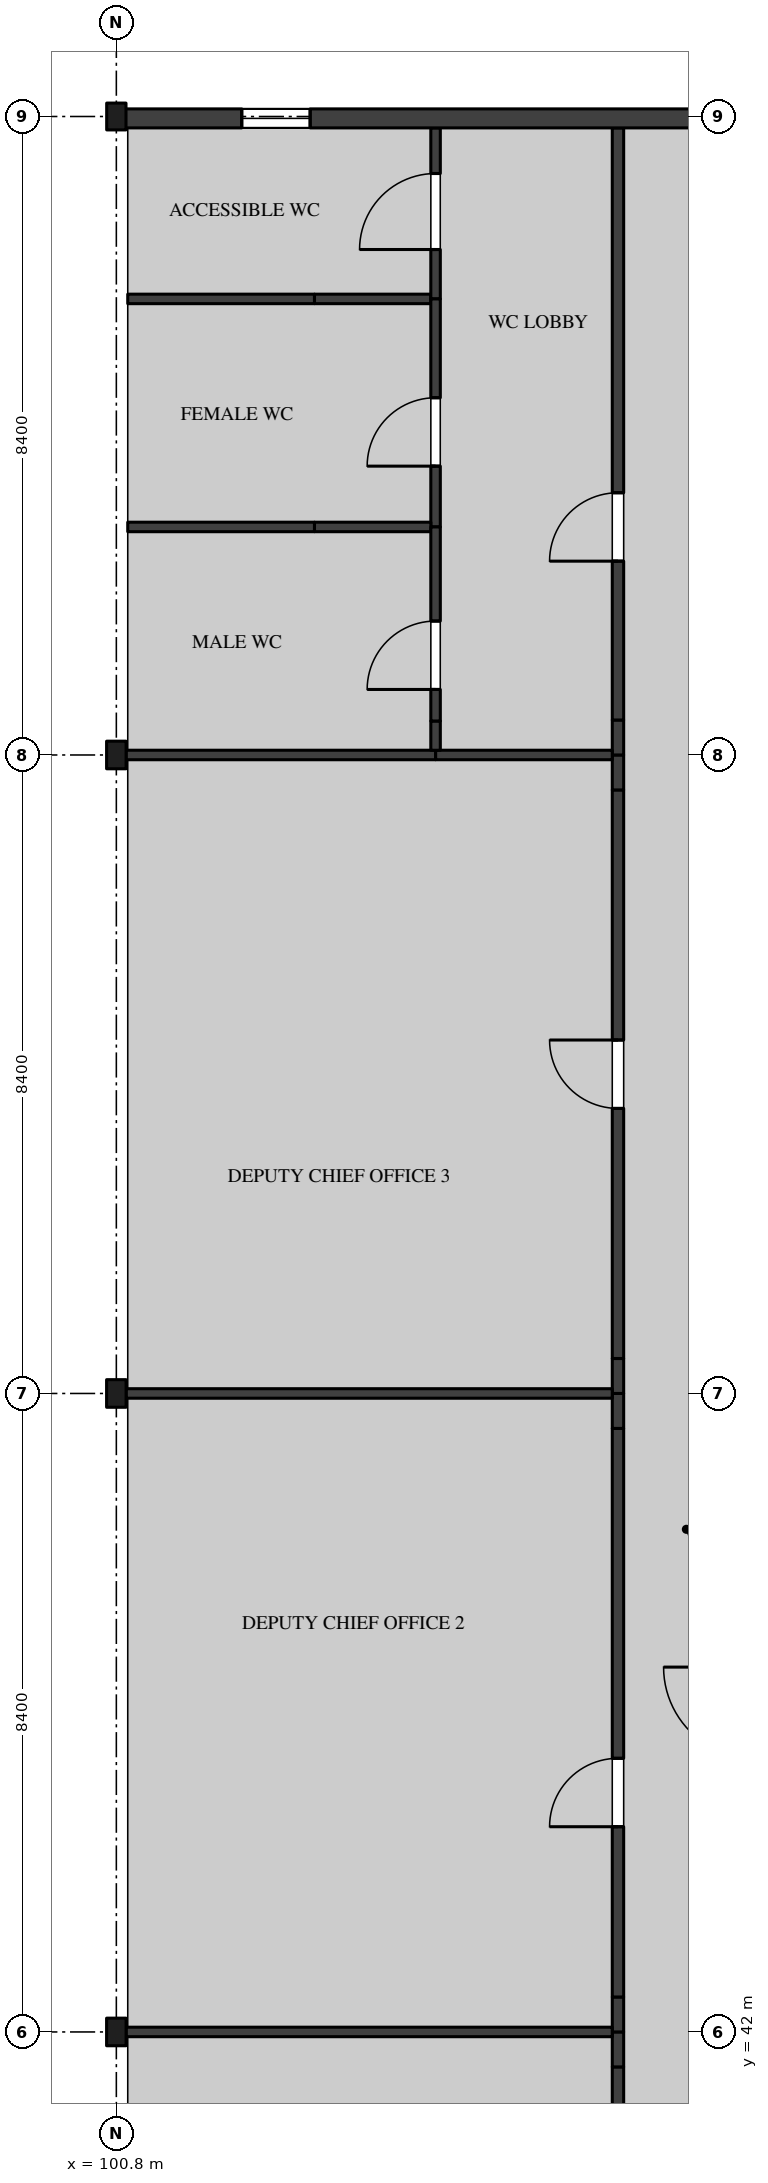
"""IFC4 building model, lengths in metres.
Left out: names, types, materials, properties, quantities, classifications, styles, units other than length and angle.
Written with IfcOpenShell. Run it as: python <this file> out.ifc"""

import sys

from ifc_helpers import new_model, si_unit, direction, frame, frame_2d, origin, origin_2d, place, context, subcontext, project, spatial, rectangle, i_section, extrude, element, fill, save


model = new_model("IFC4")
c1 = context("Model", 3, precision=1e-05, world=origin(), true_north=direction((0.0, 1.0)))
c2 = subcontext(c1, "Body", "Model", "MODEL_VIEW")
j1 = project(units=[si_unit("LENGTHUNIT", "METRE"), si_unit("PLANEANGLEUNIT", "RADIAN")], contexts=[c1])
p1 = place(None, origin())
s1 = spatial("IfcSite", under=j1, at=p1, CompositionType="ELEMENT")
p2 = place(p1, origin())
s2 = spatial("IfcBuilding", under=s1, at=p2, CompositionType="ELEMENT")
p3 = place(p2, frame((0.0, 0.0, 36.9)))
s3 = spatial("IfcBuildingStorey", under=s2, at=p3, CompositionType="ELEMENT", Elevation=36.9)
for number, where, z_axis, x_axis in (
    (1, (100.8, 42.0, 0.0), (0.0, 0.0, 1.0), (1.0, 0.0, 0.0)),
    (2, (100.8, 50.4, 0.0), (0.0, 0.0, 1.0), (1.0, 0.0, 0.0)),
    (3, (100.8, 58.8, 0.0), (0.0, 0.0, 1.0), (1.0, 0.0, 0.0)),
):
    element("IfcColumn", number, at=place(p3, frame(where, z_axis=z_axis, x_axis=x_axis)), inside=s3, PredefinedType="COLUMN", context=c2, shape_type="SweptSolid", body=[
        extrude(i_section(OverallWidth=0.257, OverallDepth=0.363, WebThickness=0.013, FlangeThickness=0.022, FilletRadius=0.015, at=origin_2d()), origin(), (0.0, 0.0, 1.0), 4.37),
    ])
p4 = place(p3, frame((100.8, 67.2, 0.0), z_axis=(0.0, 0.0, 1.0), x_axis=(1.0, 0.0, 0.0)))
e4 = element("IfcColumn", 4, at=p4, inside=s3, PredefinedType="COLUMN", context=c2, shape_type="SweptSolid", body=[
    extrude(i_section(OverallWidth=0.254, OverallDepth=0.353, WebThickness=0.01, FlangeThickness=0.016, FilletRadius=0.015, at=origin_2d()), origin(), (0.0, 0.0, 1.0), 4.37),
])
p5 = place(p3, frame((107.4, 33.75, 0.0), z_axis=(0.0, 0.0, 1.0), x_axis=(0.0, 1.0, 0.0)))
e5 = element("IfcWall", 5, at=p5, inside=s3, PredefinedType="PARTITIONING", context=c2, shape_type="SweptSolid", body=[
    extrude(rectangle(XDim=7.79, YDim=0.15, at=frame_2d((3.895, 0.0))), origin(), (0.0, 0.0, 1.0), 4.37),
])
p6 = place(p5, frame((3.6, 0.0, 0.0)))
e6 = element("IfcOpeningElement", 6, at=p6, cuts=e5, PredefinedType="OPENING", context=c2, shape_type="SweptSolid", body=[
    extrude(rectangle(XDim=0.9, YDim=2.1, at=frame_2d((0.45, 1.05))), frame((0.0, 0.085, 0.0), z_axis=(0.0, -1.0, 0.0), x_axis=(1.0, 0.0, 0.0)), (0.0, 0.0, 1.0), 0.17),
])
for number, where, z_axis, x_axis in (
    (7, (107.4, 41.54, 0.0), (0.0, 0.0, 1.0), (0.0, 1.0, 0.0)),
    (8, (107.4, 42.0, 0.0), (0.0, 0.0, 1.0), (0.0, 1.0, 0.0)),
):
    element("IfcWall", number, at=place(p3, frame(where, z_axis=z_axis, x_axis=x_axis)), inside=s3, PredefinedType="PARTITIONING", context=c2, shape_type="SweptSolid", body=[
        extrude(rectangle(XDim=0.46, YDim=0.15, at=frame_2d((0.23, 0.0))), origin(), (0.0, 0.0, 1.0), 3.817),
    ])
p7 = place(p3, frame((107.4, 42.46, 0.0), z_axis=(0.0, 0.0, 1.0), x_axis=(0.0, 1.0, 0.0)))
e9 = element("IfcWall", 9, at=p7, inside=s3, PredefinedType="PARTITIONING", context=c2, shape_type="SweptSolid", body=[
    extrude(rectangle(XDim=7.48, YDim=0.15, at=frame_2d((3.74, 0.0))), origin(), (0.0, 0.0, 1.0), 4.37),
])
p8 = place(p7, frame((2.24, 0.0, 0.0)))
e10 = element("IfcOpeningElement", 10, at=p8, cuts=e9, PredefinedType="OPENING", context=c2, shape_type="SweptSolid", body=[
    extrude(rectangle(XDim=0.9, YDim=2.1, at=frame_2d((0.45, 1.05))), frame((0.0, 0.085, 0.0), z_axis=(0.0, -1.0, 0.0), x_axis=(1.0, 0.0, 0.0)), (0.0, 0.0, 1.0), 0.17),
])
p9 = place(p3, frame((107.4, 49.94, 0.0), z_axis=(0.0, 0.0, 1.0), x_axis=(0.0, 1.0, 0.0)))
e11 = element("IfcWall", 11, at=p9, inside=s3, PredefinedType="PARTITIONING", context=c2, shape_type="SweptSolid", body=[
    extrude(rectangle(XDim=0.46, YDim=0.15, at=frame_2d((0.23, 0.0))), origin(), (0.0, 0.0, 1.0), 3.817),
])
p10 = place(p3, frame((107.4, 50.4, 0.0), z_axis=(0.0, 0.0, 1.0), x_axis=(0.0, 1.0, 0.0)))
e12 = element("IfcWall", 12, at=p10, inside=s3, PredefinedType="PARTITIONING", context=c2, shape_type="SweptSolid", body=[
    extrude(rectangle(XDim=0.46, YDim=0.15, at=frame_2d((0.23, 0.0))), origin(), (0.0, 0.0, 1.0), 3.817),
])
p11 = place(p3, frame((107.4, 50.86, 0.0), z_axis=(0.0, 0.0, 1.0), x_axis=(0.0, 1.0, 0.0)))
e13 = element("IfcWall", 13, at=p11, inside=s3, PredefinedType="PARTITIONING", context=c2, shape_type="SweptSolid", body=[
    extrude(rectangle(XDim=7.48, YDim=0.15, at=frame_2d((3.74, 0.0))), origin(), (0.0, 0.0, 1.0), 4.37),
])
p12 = place(p11, frame((3.29, 0.0, 0.0)))
e14 = element("IfcOpeningElement", 14, at=p12, cuts=e13, PredefinedType="OPENING", context=c2, shape_type="SweptSolid", body=[
    extrude(rectangle(XDim=0.9, YDim=2.1, at=frame_2d((0.45, 1.05))), frame((0.0, 0.085, 0.0), z_axis=(0.0, -1.0, 0.0), x_axis=(1.0, 0.0, 0.0)), (0.0, 0.0, 1.0), 0.17),
])
for number, where, z_axis, x_axis in (
    (15, (107.4, 58.34, 0.0), (0.0, 0.0, 1.0), (0.0, 1.0, 0.0)),
    (16, (107.4, 58.8, 0.0), (0.0, 0.0, 1.0), (0.0, 1.0, 0.0)),
):
    element("IfcWall", number, at=place(p3, frame(where, z_axis=z_axis, x_axis=x_axis)), inside=s3, PredefinedType="PARTITIONING", context=c2, shape_type="SweptSolid", body=[
        extrude(rectangle(XDim=0.46, YDim=0.15, at=frame_2d((0.23, 0.0))), origin(), (0.0, 0.0, 1.0), 3.817),
    ])
p13 = place(p3, frame((107.4, 59.26, 0.0), z_axis=(0.0, 0.0, 1.0), x_axis=(0.0, 1.0, 0.0)))
e17 = element("IfcWall", 17, at=p13, inside=s3, PredefinedType="PARTITIONING", context=c2, shape_type="SweptSolid", body=[
    extrude(rectangle(XDim=7.79, YDim=0.15, at=frame_2d((3.895, 0.0))), origin(), (0.0, 0.0, 1.0), 4.37),
])
p14 = place(p13, frame((2.09, 0.0, 0.0)))
e18 = element("IfcOpeningElement", 18, at=p14, cuts=e17, PredefinedType="OPENING", context=c2, shape_type="SweptSolid", body=[
    extrude(rectangle(XDim=0.9, YDim=2.1, at=frame_2d((0.45, 1.05))), frame((0.0, 0.085, 0.0), z_axis=(0.0, -1.0, 0.0), x_axis=(1.0, 0.0, 0.0)), (0.0, 0.0, 1.0), 0.17),
])
for number, where, z_axis, x_axis in (
    (19, (100.928, 42.0, 0.0), (0.0, 0.0, 1.0), (1.0, 0.0, 0.0)),
    (20, (100.928, 50.4, 0.0), (0.0, 0.0, 1.0), (1.0, 0.0, 0.0)),
):
    element("IfcWall", number, at=place(p3, frame(where, z_axis=z_axis, x_axis=x_axis)), inside=s3, PredefinedType="PARTITIONING", context=c2, shape_type="SweptSolid", body=[
        extrude(rectangle(XDim=6.397, YDim=0.125, at=frame_2d((3.198, 0.0))), origin(), (0.0, 0.0, 1.0), 3.817),
    ])
p15 = place(p3, frame((105.0, 58.8, 0.0), z_axis=(0.0, 0.0, 1.0), x_axis=(1.0, 0.0, 0.0)))
e21 = element("IfcWall", 21, at=p15, inside=s3, PredefinedType="PARTITIONING", context=c2, shape_type="SweptSolid", body=[
    extrude(rectangle(XDim=2.325, YDim=0.125, at=frame_2d((1.163, 0.0))), origin(), (0.0, 0.0, 1.0), 3.817),
])
p16 = place(p3, frame((100.928, 58.8, 0.0), z_axis=(0.0, 0.0, 1.0), x_axis=(1.0, 0.0, 0.0)))
e22 = element("IfcWall", 22, at=p16, inside=s3, PredefinedType="PARTITIONING", context=c2, shape_type="SweptSolid", body=[
    extrude(rectangle(XDim=4.072, YDim=0.125, at=frame_2d((2.036, 0.0))), origin(), (0.0, 0.0, 1.0), 3.817),
])
p17 = place(p3, frame((100.95, 64.8, 0.0), z_axis=(0.0, 0.0, 1.0), x_axis=(1.0, 0.0, 0.0)))
e23 = element("IfcWall", 23, at=p17, inside=s3, PredefinedType="PARTITIONING", context=c2, shape_type="SweptSolid", body=[
    extrude(rectangle(XDim=2.457, YDim=0.125, at=frame_2d((1.229, 0.0))), origin(), (0.0, 0.0, 1.0), 4.37),
])
p18 = place(p3, frame((103.407, 64.8, 0.0), z_axis=(0.0, 0.0, 1.0), x_axis=(1.0, 0.0, 0.0)))
e24 = element("IfcWall", 24, at=p18, inside=s3, PredefinedType="PARTITIONING", context=c2, shape_type="SweptSolid", body=[
    extrude(rectangle(XDim=1.531, YDim=0.125, at=frame_2d((0.766, 0.0))), origin(), (0.0, 0.0, 1.0), 3.946),
])
p19 = place(p3, frame((105.0, 64.8, 0.0), z_axis=(0.0, 0.0, 1.0), x_axis=(0.0, 1.0, 0.0)))
e25 = element("IfcWall", 25, at=p19, inside=s3, PredefinedType="PARTITIONING", context=c2, shape_type="SweptSolid", body=[
    extrude(rectangle(XDim=2.25, YDim=0.125, at=frame_2d((1.125, 0.0))), origin(), (0.0, 0.0, 1.0), 4.37),
])
p20 = place(p19, frame((0.65, 0.0, 0.0)))
e26 = element("IfcOpeningElement", 26, at=p20, cuts=e25, PredefinedType="OPENING", context=c2, shape_type="SweptSolid", body=[
    extrude(rectangle(XDim=1.0, YDim=2.1, at=frame_2d((0.5, 1.05))), frame((0.0, 0.073, 0.0), z_axis=(0.0, -1.0, 0.0), x_axis=(1.0, 0.0, 0.0)), (0.0, 0.0, 1.0), 0.145),
])
p21 = place(p3, frame((105.0, 61.8, 0.0), z_axis=(0.0, 0.0, 1.0), x_axis=(0.0, 1.0, 0.0)))
e27 = element("IfcWall", 27, at=p21, inside=s3, PredefinedType="PARTITIONING", context=c2, shape_type="SweptSolid", body=[
    extrude(rectangle(XDim=3.0, YDim=0.125, at=frame_2d((1.5, 0.0))), origin(), (0.0, 0.0, 1.0), 4.37),
])
p22 = place(p21, frame((0.8, 0.0, 0.0)))
e28 = element("IfcOpeningElement", 28, at=p22, cuts=e27, PredefinedType="OPENING", context=c2, shape_type="SweptSolid", body=[
    extrude(rectangle(XDim=0.9, YDim=2.1, at=frame_2d((0.45, 1.05))), frame((0.0, 0.073, 0.0), z_axis=(0.0, -1.0, 0.0), x_axis=(1.0, 0.0, 0.0)), (0.0, 0.0, 1.0), 0.145),
])
p23 = place(p3, frame((100.95, 61.8, 0.0), z_axis=(0.0, 0.0, 1.0), x_axis=(1.0, 0.0, 0.0)))
e29 = element("IfcWall", 29, at=p23, inside=s3, PredefinedType="PARTITIONING", context=c2, shape_type="SweptSolid", body=[
    extrude(rectangle(XDim=2.457, YDim=0.125, at=frame_2d((1.229, 0.0))), origin(), (0.0, 0.0, 1.0), 4.37),
])
p24 = place(p3, frame((103.407, 61.8, 0.0), z_axis=(0.0, 0.0, 1.0), x_axis=(1.0, 0.0, 0.0)))
e30 = element("IfcWall", 30, at=p24, inside=s3, PredefinedType="PARTITIONING", context=c2, shape_type="SweptSolid", body=[
    extrude(rectangle(XDim=1.531, YDim=0.125, at=frame_2d((0.766, 0.0))), origin(), (0.0, 0.0, 1.0), 3.946),
])
p25 = place(p3, frame((105.0, 58.862, 0.0), z_axis=(0.0, 0.0, 1.0), x_axis=(0.0, 1.0, 0.0)))
e31 = element("IfcWall", 31, at=p25, inside=s3, PredefinedType="PARTITIONING", context=c2, shape_type="SweptSolid", body=[
    extrude(rectangle(XDim=0.385, YDim=0.125, at=frame_2d((0.192, 0.0))), origin(), (0.0, 0.0, 1.0), 3.817),
])
p26 = place(p3, frame((105.0, 59.247, 0.0), z_axis=(0.0, 0.0, 1.0), x_axis=(0.0, 1.0, 0.0)))
e32 = element("IfcWall", 32, at=p26, inside=s3, PredefinedType="PARTITIONING", context=c2, shape_type="SweptSolid", body=[
    extrude(rectangle(XDim=2.553, YDim=0.125, at=frame_2d((1.276, 0.0))), origin(), (0.0, 0.0, 1.0), 4.37),
])
p27 = place(p26, frame((0.415, 0.0, 0.0)))
e33 = element("IfcOpeningElement", 33, at=p27, cuts=e32, PredefinedType="OPENING", context=c2, shape_type="SweptSolid", body=[
    extrude(rectangle(XDim=0.9, YDim=2.1, at=frame_2d((0.45, 1.05))), frame((0.0, 0.073, 0.0), z_axis=(0.0, -1.0, 0.0), x_axis=(1.0, 0.0, 0.0)), (0.0, 0.0, 1.0), 0.145),
])
p28 = place(p3, frame((109.0, 67.175, 0.0), z_axis=(0.0, 0.0, 1.0), x_axis=(-1.0, 0.0, 0.0)))
e34 = element("IfcWall", 34, at=p28, inside=s3, PredefinedType="SOLIDWALL", context=c2, shape_type="SweptSolid", body=[
    extrude(rectangle(XDim=8.195, YDim=0.25, at=frame_2d((4.097, 0.0))), origin(), (0.0, 0.0, 1.0), 3.819),
])
p29 = place(p28, frame((5.65, 0.0, 1.5)))
e35 = element("IfcOpeningElement", 35, at=p29, cuts=e34, PredefinedType="OPENING", context=c2, shape_type="SweptSolid", body=[
    extrude(rectangle(XDim=0.9, YDim=1.2, at=frame_2d((0.45, 0.6))), frame((0.0, 0.135, 0.0), z_axis=(0.0, -1.0, 0.0), x_axis=(1.0, 0.0, 0.0)), (0.0, 0.0, 1.0), 0.27),
])
p30 = place(p8, origin())
e36 = element("IfcDoor", 36, at=p30, inside=s3, OperationType="SINGLE_SWING_RIGHT", PredefinedType="DOOR", context=c2, shape_type="SweptSolid", body=[
    extrude(rectangle(XDim=0.9, YDim=2.1, at=frame_2d((0.45, 1.05))), frame((0.0, 0.025, 0.0), z_axis=(0.0, -1.0, 0.0), x_axis=(1.0, 0.0, 0.0)), (0.0, 0.0, 1.0), 0.05),
])
fill(e10, e36)
p31 = place(p12, origin())
e37 = element("IfcDoor", 37, at=p31, inside=s3, OperationType="SINGLE_SWING_LEFT", PredefinedType="DOOR", context=c2, shape_type="SweptSolid", body=[
    extrude(rectangle(XDim=0.9, YDim=2.1, at=frame_2d((0.45, 1.05))), frame((0.0, 0.025, 0.0), z_axis=(0.0, -1.0, 0.0), x_axis=(1.0, 0.0, 0.0)), (0.0, 0.0, 1.0), 0.05),
])
fill(e14, e37)
p32 = place(p20, origin())
e38 = element("IfcDoor", 38, at=p32, inside=s3, OperationType="SINGLE_SWING_RIGHT", PredefinedType="DOOR", context=c2, shape_type="SweptSolid", body=[
    extrude(rectangle(XDim=1.0, YDim=2.1, at=frame_2d((0.5, 1.05))), frame((0.0, 0.02, 0.0), z_axis=(0.0, -1.0, 0.0), x_axis=(1.0, 0.0, 0.0)), (0.0, 0.0, 1.0), 0.04),
])
fill(e26, e38)
p33 = place(p22, origin())
e39 = element("IfcDoor", 39, at=p33, inside=s3, OperationType="SINGLE_SWING_RIGHT", PredefinedType="DOOR", context=c2, shape_type="SweptSolid", body=[
    extrude(rectangle(XDim=0.9, YDim=2.1, at=frame_2d((0.45, 1.05))), frame((0.0, 0.02, 0.0), z_axis=(0.0, -1.0, 0.0), x_axis=(1.0, 0.0, 0.0)), (0.0, 0.0, 1.0), 0.04),
])
fill(e28, e39)
p34 = place(p14, origin())
e40 = element("IfcDoor", 40, at=p34, inside=s3, OperationType="SINGLE_SWING_RIGHT", PredefinedType="DOOR", context=c2, shape_type="SweptSolid", body=[
    extrude(rectangle(XDim=0.9, YDim=2.1, at=frame_2d((0.45, 1.05))), frame((0.0, 0.025, 0.0), z_axis=(0.0, -1.0, 0.0), x_axis=(1.0, 0.0, 0.0)), (0.0, 0.0, 1.0), 0.05),
])
fill(e18, e40)
p35 = place(p27, origin())
e41 = element("IfcDoor", 41, at=p35, inside=s3, OperationType="SINGLE_SWING_RIGHT", PredefinedType="DOOR", context=c2, shape_type="SweptSolid", body=[
    extrude(rectangle(XDim=0.9, YDim=2.1, at=frame_2d((0.45, 1.05))), frame((0.0, 0.02, 0.0), z_axis=(0.0, -1.0, 0.0), x_axis=(1.0, 0.0, 0.0)), (0.0, 0.0, 1.0), 0.04),
])
fill(e33, e41)
p36 = place(p29, origin())
e42 = element("IfcWindow", 42, at=p36, inside=s3, PartitioningType="SINGLE_PANEL", PredefinedType="WINDOW", context=c2, shape_type="SweptSolid", body=[
    extrude(rectangle(XDim=0.9, YDim=1.2, at=frame_2d((0.45, 0.6))), frame((0.0, 0.03, 0.0), z_axis=(0.0, -1.0, 0.0), x_axis=(1.0, 0.0, 0.0)), (0.0, 0.0, 1.0), 0.06),
])
fill(e35, e42)
save(model, sys.argv[1])
